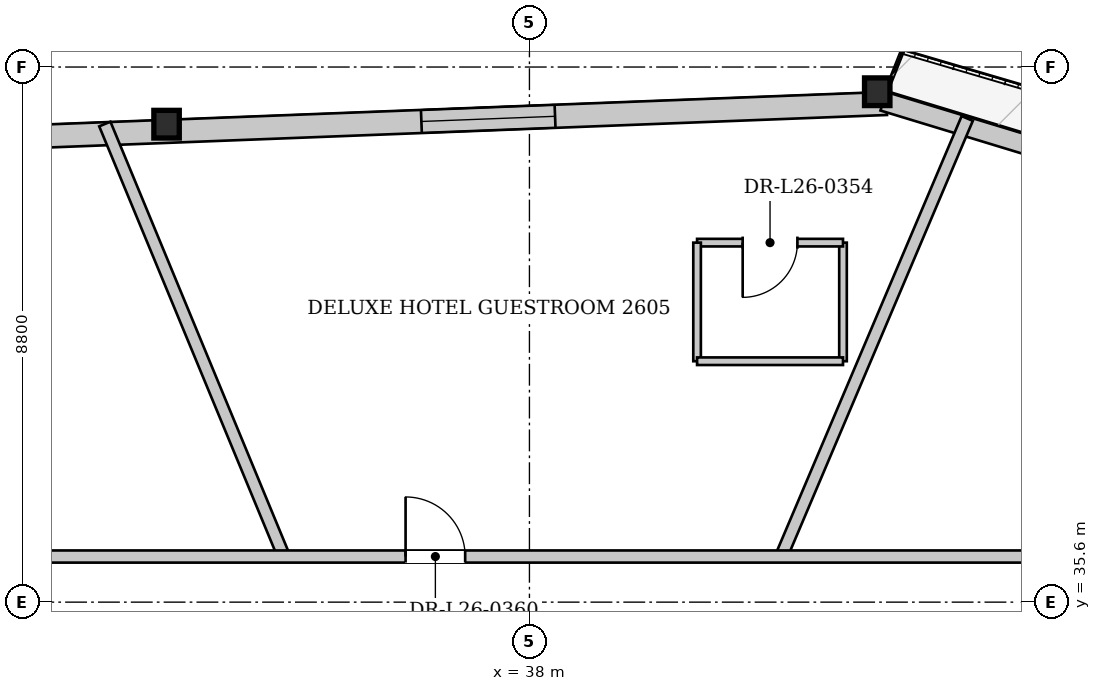
"""IFC4 building model, lengths in metres.
Left out: names, types, materials, properties, quantities, classifications, styles, units other than length and angle.
Written with IfcOpenShell. Run it as: python <this file> out.ifc"""

import sys

from ifc_helpers import new_model, si_unit, direction, frame, frame_2d, origin, origin_2d, place, context, subcontext, project, spatial, rectangle, i_section, extrude, source, transform, mapped, element, fill, save


model = new_model("IFC4")
c1 = context("Model", 3, precision=1e-05, world=origin(), true_north=direction((0.0, 1.0)))
c2 = subcontext(c1, "Body", "Model", "MODEL_VIEW")
j1 = project(units=[si_unit("LENGTHUNIT", "METRE"), si_unit("PLANEANGLEUNIT", "RADIAN")], contexts=[c1])
p1 = place(None, origin())
s1 = spatial("IfcSite", under=j1, at=p1, CompositionType="ELEMENT")
p2 = place(p1, origin())
s2 = spatial("IfcBuilding", under=s1, at=p2, CompositionType="ELEMENT")
p3 = place(p2, frame((0.0, 0.0, 102.15)))
s3 = spatial("IfcBuildingStorey", under=s2, at=p3, CompositionType="ELEMENT", Elevation=102.15)
m1 = source(origin(), c2, "Body", "SweptSolid", [
    extrude(i_section(OverallWidth=0.418, OverallDepth=0.455, WebThickness=0.038, FlangeThickness=0.059, at=origin_2d()), origin(), (0.0, 0.0, 1.0), 3.398),
])
p4 = place(p3, frame((43.866, 43.991, 0.0), z_axis=(-0.08615507832, 0.001652682904, 0.996280367727), x_axis=(-0.019179123824, -0.999816063688, 0.0)))
e1 = element("IfcColumn", 1, at=p4, inside=s3, PredefinedType="COLUMN", context=c2, shape_type="MappedRepresentation", body=[
    mapped(m1, transform((0.0, 0.0, 0.0), x_axis=(1.0, 0.0, 0.0), y_axis=(0.0, 1.0, 0.0), z_axis=(0.0, 0.0, 1.0), scale=1.0)),
])
m2 = source(origin(), c2, "Body", "SweptSolid", [
    extrude(i_section(OverallWidth=0.418, OverallDepth=0.455, WebThickness=0.038, FlangeThickness=0.059, at=origin_2d()), origin(), (0.0, 0.0, 1.0), 3.399),
])
p5 = place(p3, frame((32.167, 43.537, 0.0), z_axis=(-0.079291660334, -0.045463424811, 0.995814194318), x_axis=(0.497407768094, -0.86751686568, 0.0)))
e2 = element("IfcColumn", 2, at=p5, inside=s3, PredefinedType="COLUMN", context=c2, shape_type="MappedRepresentation", body=[
    mapped(m2, transform((0.0, 0.0, 0.0), x_axis=(1.0, 0.0, 0.0), y_axis=(0.0, 1.0, 0.0), z_axis=(0.0, 0.0, 1.0), scale=1.0)),
])
p6 = place(p3, frame((20.475, 42.894, 0.0), z_axis=(0.0, 0.0, 1.0), x_axis=(0.999249191087, 0.038743439593, 0.0)))
e3 = element("IfcWall", 3, at=p6, inside=s3, PredefinedType="SOLIDWALL", context=c2, shape_type="SweptSolid", body=[
    extrude(rectangle(XDim=23.416, YDim=0.38, at=frame_2d((11.708, 0.0))), origin(), (0.0, 0.0, 1.0), 2.692),
])
p7 = place(p6, frame((5.457, 0.0, 0.322)))
e4 = element("IfcOpeningElement", 4, at=p7, cuts=e3, PredefinedType="OPENING", context=c2, shape_type="SweptSolid", body=[
    extrude(rectangle(XDim=2.2, YDim=2.25, at=frame_2d((1.1, 1.125))), frame((0.0, 0.2, 0.0), z_axis=(0.0, -1.0, 0.0), x_axis=(1.0, 0.0, 0.0)), (0.0, 0.0, 1.0), 0.4),
])
p8 = place(p6, frame((15.76, 0.0, 0.322)))
e5 = element("IfcOpeningElement", 5, at=p8, cuts=e3, PredefinedType="OPENING", context=c2, shape_type="SweptSolid", body=[
    extrude(rectangle(XDim=2.2, YDim=2.25, at=frame_2d((1.1, 1.125))), frame((0.0, 0.2, 0.0), z_axis=(0.0, -1.0, 0.0), x_axis=(1.0, 0.0, 0.0)), (0.0, 0.0, 1.0), 0.4),
])
p9 = place(p3, frame((43.82, 43.838, 0.0), z_axis=(0.0, 0.0, 1.0), x_axis=(0.956744940145, -0.290928031491, 0.0)))
e6 = element("IfcWall", 6, at=p9, inside=s3, PredefinedType="SOLIDWALL", context=c2, shape_type="SweptSolid", body=[
    extrude(rectangle(XDim=23.417, YDim=0.32, at=frame_2d((11.708, 0.0))), origin(), (0.0, 0.0, 1.0), 2.692),
])
p10 = place(p9, frame((6.943, 0.0, 0.0)))
e7 = element("IfcOpeningElement", 7, at=p10, cuts=e6, PredefinedType="OPENING", context=c2, shape_type="SweptSolid", body=[
    extrude(rectangle(XDim=1.1, YDim=2.3, at=frame_2d((0.55, 1.15))), frame((0.0, 0.17, 0.0), z_axis=(0.0, -1.0, 0.0), x_axis=(1.0, 0.0, 0.0)), (0.0, 0.0, 1.0), 0.34),
])
p11 = place(p9, frame((16.428, 0.0, 0.372)))
e8 = element("IfcOpeningElement", 8, at=p11, cuts=e6, PredefinedType="OPENING", context=c2, shape_type="SweptSolid", body=[
    extrude(rectangle(XDim=1.8, YDim=2.2, at=frame_2d((0.9, 1.1))), frame((0.0, 0.17, 0.0), z_axis=(0.0, -1.0, 0.0), x_axis=(1.0, 0.0, 0.0)), (0.0, 0.0, 1.0), 0.34),
])
p12 = place(p3, frame((42.141, 36.35, 0.0), z_axis=(0.0, 0.0, 1.0), x_axis=(0.390916709441, 0.920426056932, 0.0)))
e9 = element("IfcWall", 9, at=p12, inside=s3, PredefinedType="PARTITIONING", context=c2, shape_type="SweptSolid", body=[
    extrude(rectangle(XDim=7.827, YDim=0.2, at=frame_2d((3.913, 0.0))), origin(), (0.0, 0.0, 1.0), 3.3),
])
p13 = place(p3, frame((33.962, 36.35, 0.0), z_axis=(0.0, 0.0, 1.0), x_axis=(-0.382610403036, 0.923909778868, 0.0)))
e10 = element("IfcWall", 10, at=p13, inside=s3, PredefinedType="PARTITIONING", context=c2, shape_type="SweptSolid", body=[
    extrude(rectangle(XDim=7.698, YDim=0.2, at=frame_2d((3.849, 0.0))), origin(), (0.0, 0.0, 1.0), 3.3),
])
p14 = place(p3, frame((43.157, 39.562, 0.0), z_axis=(0.0, 0.0, 1.0), x_axis=(0.0, 1.0, 0.0)))
e11 = element("IfcWall", 11, at=p14, inside=s3, PredefinedType="PARTITIONING", context=c2, shape_type="SweptSolid", body=[
    extrude(rectangle(XDim=1.95, YDim=0.125, at=frame_2d((0.975, 0.0))), origin(), (0.0, 0.0, 1.0), 3.3),
])
p15 = place(p3, frame((43.157, 41.512, 0.0), z_axis=(0.0, 0.0, 1.0), x_axis=(-1.0, 0.0, 0.0)))
e12 = element("IfcWall", 12, at=p15, inside=s3, PredefinedType="PARTITIONING", context=c2, shape_type="SweptSolid", body=[
    extrude(rectangle(XDim=2.4, YDim=0.125, at=frame_2d((1.2, 0.0))), origin(), (0.0, 0.0, 1.0), 3.3),
])
p16 = place(p15, frame((0.75, 0.0, 0.0)))
e13 = element("IfcOpeningElement", 13, at=p16, cuts=e12, PredefinedType="OPENING", context=c2, shape_type="SweptSolid", body=[
    extrude(rectangle(XDim=0.9, YDim=2.1, at=frame_2d((0.45, 1.05))), frame((0.0, 0.073, 0.0), z_axis=(0.0, -1.0, 0.0), x_axis=(1.0, 0.0, 0.0)), (0.0, 0.0, 1.0), 0.145),
])
p17 = place(p3, frame((40.757, 41.512, 0.0), z_axis=(0.0, 0.0, 1.0), x_axis=(0.0, -1.0, 0.0)))
e14 = element("IfcWall", 14, at=p17, inside=s3, PredefinedType="PARTITIONING", context=c2, shape_type="SweptSolid", body=[
    extrude(rectangle(XDim=1.95, YDim=0.125, at=frame_2d((0.975, 0.0))), origin(), (0.0, 0.0, 1.0), 3.3),
])
p18 = place(p3, frame((40.757, 39.562, 0.0), z_axis=(0.0, 0.0, 1.0), x_axis=(1.0, 0.0, 0.0)))
e15 = element("IfcWall", 15, at=p18, inside=s3, PredefinedType="PARTITIONING", context=c2, shape_type="SweptSolid", body=[
    extrude(rectangle(XDim=2.4, YDim=0.125, at=frame_2d((1.2, 0.0))), origin(), (0.0, 0.0, 1.0), 3.045),
])
p19 = place(p3, frame((27.45, 36.35, 0.0), z_axis=(0.0, 0.0, 1.0), x_axis=(1.0, 0.0, 0.0)))
e16 = element("IfcWall", 16, at=p19, inside=s3, PredefinedType="PARTITIONING", context=c2, shape_type="SweptSolid", body=[
    extrude(rectangle(XDim=21.1, YDim=0.2, at=frame_2d((10.55, 0.0))), origin(), (0.0, 0.0, 1.0), 3.3),
])
p20 = place(p19, frame((19.82, 0.0, 0.0)))
e17 = element("IfcOpeningElement", 17, at=p20, cuts=e16, PredefinedType="OPENING", context=c2, shape_type="SweptSolid", body=[
    extrude(rectangle(XDim=0.98, YDim=2.15, at=frame_2d((0.49, 1.075))), frame((0.0, 0.11, 0.0), z_axis=(0.0, -1.0, 0.0), x_axis=(1.0, 0.0, 0.0)), (0.0, 0.0, 1.0), 0.22),
])
p21 = place(p19, frame((8.513, 0.0, 0.0)))
e18 = element("IfcOpeningElement", 18, at=p21, cuts=e16, PredefinedType="OPENING", context=c2, shape_type="SweptSolid", body=[
    extrude(rectangle(XDim=0.98, YDim=2.15, at=frame_2d((0.49, 1.075))), frame((0.0, 0.11, 0.0), z_axis=(0.0, -1.0, 0.0), x_axis=(1.0, 0.0, 0.0)), (0.0, 0.0, 1.0), 0.22),
])
m3 = source(origin(), c2, "Body", "SweptSolid", [
    extrude(rectangle(XDim=2.2, YDim=2.25, at=frame_2d((1.1, 1.125))), frame((0.0, 0.03, 0.0), z_axis=(0.0, -1.0, 0.0), x_axis=(1.0, 0.0, 0.0)), (0.0, 0.0, 1.0), 0.06),
])
p22 = place(p8, origin())
e19 = element("IfcWindow", 19, at=p22, inside=s3, PartitioningType="SINGLE_PANEL", PredefinedType="WINDOW", context=c2, shape_type="MappedRepresentation", body=[
    mapped(m3, transform((0.0, 0.0, 0.0), x_axis=(1.0, 0.0, 0.0), y_axis=(0.0, 1.0, 0.0), z_axis=(0.0, 0.0, 1.0), scale=1.0)),
])
fill(e5, e19)
m4 = source(origin(), c2, "Body", "SweptSolid", [
    extrude(rectangle(XDim=0.9, YDim=2.1, at=frame_2d((0.45, 1.05))), frame((0.0, 0.025, 0.0), z_axis=(0.0, -1.0, 0.0), x_axis=(1.0, 0.0, 0.0)), (0.0, 0.0, 1.0), 0.05),
])
p23 = place(p16, origin())
e20 = element("IfcDoor", 20, at=p23, inside=s3, OperationType="SINGLE_SWING_RIGHT", PredefinedType="DOOR", context=c2, shape_type="MappedRepresentation", body=[
    mapped(m4, transform((0.0, 0.0, 0.0), x_axis=(1.0, 0.0, 0.0), y_axis=(0.0, 1.0, 0.0), z_axis=(0.0, 0.0, 1.0), scale=1.0)),
])
fill(e13, e20)
m5 = source(origin(), c2, "Body", "SweptSolid", [
    extrude(rectangle(XDim=0.98, YDim=2.15, at=frame_2d((0.49, 1.075))), frame((0.0, 0.025, 0.0), z_axis=(0.0, -1.0, 0.0), x_axis=(1.0, 0.0, 0.0)), (0.0, 0.0, 1.0), 0.05),
])
p24 = place(p21, origin())
e21 = element("IfcDoor", 21, at=p24, inside=s3, OperationType="SINGLE_SWING_LEFT", PredefinedType="DOOR", context=c2, shape_type="MappedRepresentation", body=[
    mapped(m5, transform((0.0, 0.0, 0.0), x_axis=(1.0, 0.0, 0.0), y_axis=(0.0, 1.0, 0.0), z_axis=(0.0, 0.0, 1.0), scale=1.0)),
])
fill(e18, e21)
save(model, sys.argv[1])
